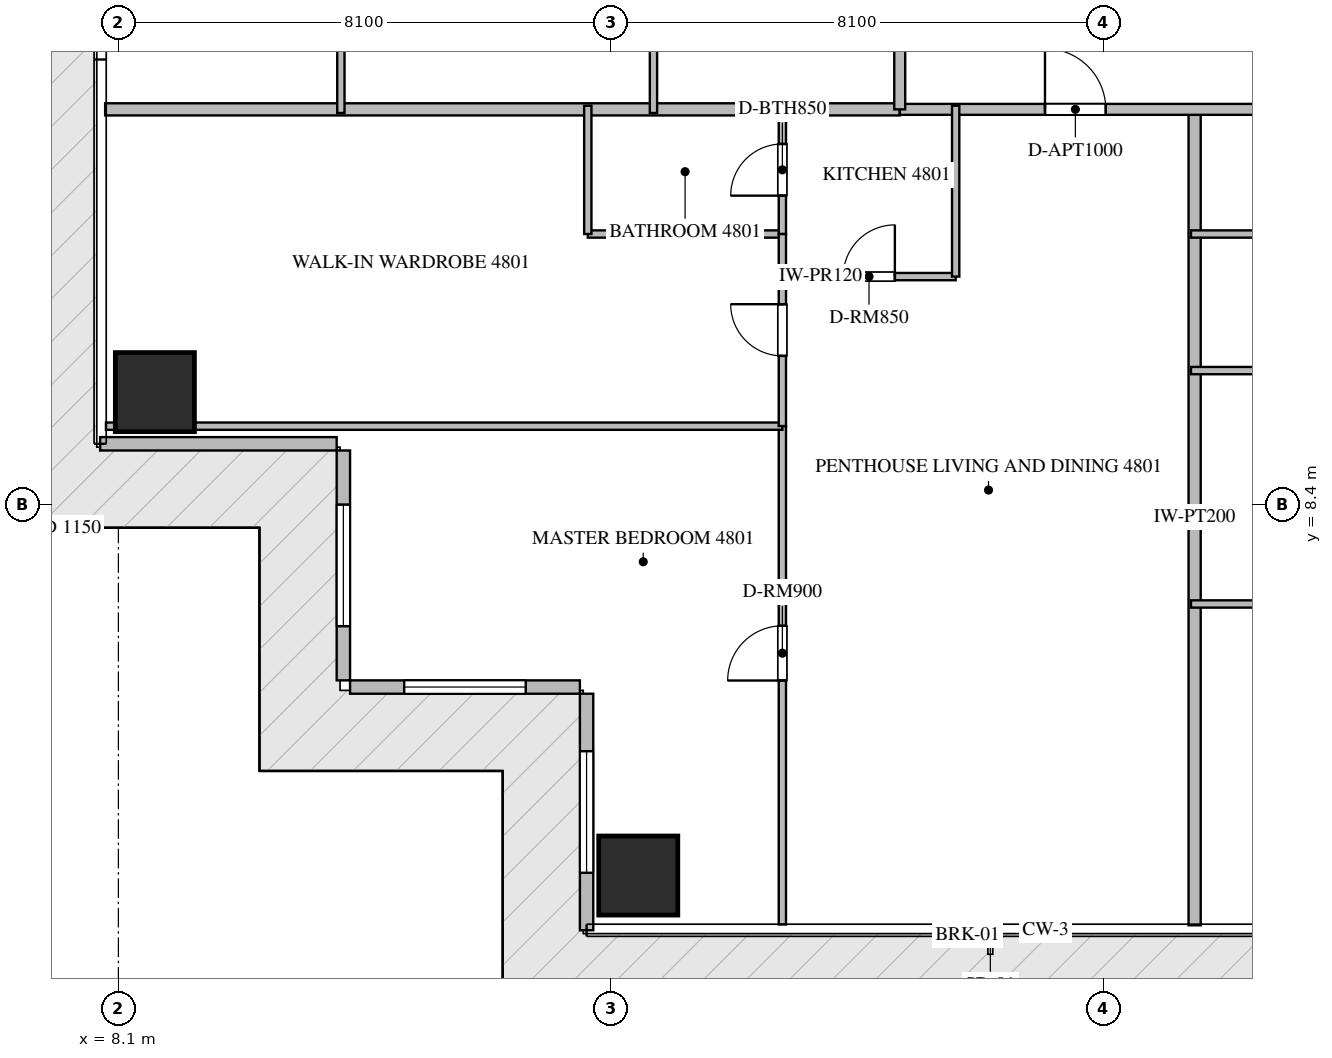
"""IFC4 building model, lengths in metres.
Left out: names, types, materials, properties, quantities, classifications, styles, units other than length and angle.
Written with IfcOpenShell. Run it as: python <this file> out.ifc"""

import sys

from ifc_helpers import new_model, si_unit, direction, frame, frame_2d, origin, origin_2d, place, context, subcontext, project, spatial, rectangle, extrude, source, transform, mapped, element, fill, save


model = new_model("IFC4")
c1 = context("Model", 3, precision=1e-05, world=origin(), true_north=direction((0.0, 1.0)))
c2 = subcontext(c1, "Body", "Model", "MODEL_VIEW")
j1 = project(units=[si_unit("LENGTHUNIT", "METRE"), si_unit("PLANEANGLEUNIT", "RADIAN")], contexts=[c1])
p1 = place(None, origin())
s1 = spatial("IfcSite", under=j1, at=p1, CompositionType="ELEMENT")
p2 = place(p1, origin())
s2 = spatial("IfcBuilding", under=s1, at=p2, CompositionType="ELEMENT")
p3 = place(p2, frame((0.0, 0.0, 191.4)))
s3 = spatial("IfcBuildingStorey", under=s2, at=p3, CompositionType="ELEMENT", Elevation=191.4)
m1 = source(origin(), c2, "Body", "SweptSolid", [
    extrude(rectangle(XDim=1.3, YDim=1.3, at=origin_2d()), origin(), (0.0, 0.0, 1.0), 3.75),
])
for number, where, z_axis, x_axis in (
    (1, (16.65, 2.3, -0.26), (0.0, 0.0, 1.0), (1.0, 0.0, 0.0)),
    (2, (8.7, 10.25, -0.26), (0.0, 0.0, 1.0), (1.0, 0.0, 0.0)),
):
    element("IfcColumn", number, at=place(p3, frame(where, z_axis=z_axis, x_axis=x_axis)), inside=s3, PredefinedType="COLUMN", context=c2, shape_type="MappedRepresentation", body=[
        mapped(m1, transform((0.0, 0.0, 0.0), scale=1.0)),
    ])
p4 = place(p3, frame((7.8, 9.4, 0.0), z_axis=(0.0, 0.0, 1.0), x_axis=(1.0, 0.0, 0.0)))
e3 = element("IfcWall", 3, at=p4, inside=s3, PredefinedType="ELEMENTEDWALL", context=c2, shape_type="SweptSolid", body=[
    extrude(rectangle(XDim=3.89, YDim=0.22, at=frame_2d((1.945, 0.0))), origin(), (0.0, 0.0, 1.0), 3.475),
])
p5 = place(p3, frame((11.8, 9.29, 0.0), z_axis=(0.0, 0.0, 1.0), x_axis=(0.0, -1.0, 0.0)))
e4 = element("IfcWall", 4, at=p5, inside=s3, PredefinedType="ELEMENTEDWALL", context=c2, shape_type="SweptSolid", body=[
    extrude(rectangle(XDim=3.78, YDim=0.22, at=frame_2d((1.89, 0.0))), origin(), (0.0, 0.0, 1.0), 3.475),
])
p6 = place(p5, frame((0.89, 0.0, 0.65)))
e5 = element("IfcOpeningElement", 5, at=p6, cuts=e4, PredefinedType="OPENING", context=c2, shape_type="SweptSolid", body=[
    extrude(rectangle(XDim=2.0, YDim=2.2, at=frame_2d((1.0, 1.1))), frame((0.0, 0.12, 0.0), z_axis=(0.0, -1.0, 0.0), x_axis=(1.0, 0.0, 0.0)), (0.0, 0.0, 1.0), 0.24),
])
p7 = place(p3, frame((11.91, 5.4, 0.0), z_axis=(0.0, 0.0, 1.0), x_axis=(1.0, 0.0, 0.0)))
e6 = element("IfcWall", 6, at=p7, inside=s3, PredefinedType="ELEMENTEDWALL", context=c2, shape_type="SweptSolid", body=[
    extrude(rectangle(XDim=3.78, YDim=0.22, at=frame_2d((1.89, 0.0))), origin(), (0.0, 0.0, 1.0), 3.475),
])
p8 = place(p7, frame((0.89, 0.0, 0.65)))
e7 = element("IfcOpeningElement", 7, at=p8, cuts=e6, PredefinedType="OPENING", context=c2, shape_type="SweptSolid", body=[
    extrude(rectangle(XDim=2.0, YDim=2.2, at=frame_2d((1.0, 1.1))), frame((0.0, 0.12, 0.0), z_axis=(0.0, -1.0, 0.0), x_axis=(1.0, 0.0, 0.0)), (0.0, 0.0, 1.0), 0.24),
])
p9 = place(p3, frame((15.8, 5.29, 0.0), z_axis=(0.0, 0.0, 1.0), x_axis=(0.0, -1.0, 0.0)))
e8 = element("IfcWall", 8, at=p9, inside=s3, PredefinedType="ELEMENTEDWALL", context=c2, shape_type="SweptSolid", body=[
    extrude(rectangle(XDim=3.89, YDim=0.22, at=frame_2d((1.945, 0.0))), origin(), (0.0, 0.0, 1.0), 3.475),
])
p10 = place(p9, frame((0.945, 0.0, 0.65)))
e9 = element("IfcOpeningElement", 9, at=p10, cuts=e8, PredefinedType="OPENING", context=c2, shape_type="SweptSolid", body=[
    extrude(rectangle(XDim=2.0, YDim=2.2, at=frame_2d((1.0, 1.1))), frame((0.0, 0.12, 0.0), z_axis=(0.0, -1.0, 0.0), x_axis=(1.0, 0.0, 0.0)), (0.0, 0.0, 1.0), 0.24),
])
p11 = place(p3, frame((25.8, 1.482, 0.0), z_axis=(0.0, 0.0, 1.0), x_axis=(0.0, 1.0, 0.0)))
e10 = element("IfcWall", 10, at=p11, inside=s3, PredefinedType="PARTITIONING", context=c2, shape_type="SweptSolid", body=[
    extrude(rectangle(XDim=13.418, YDim=0.2, at=frame_2d((6.709, 0.0))), origin(), (0.0, 0.0, 1.0), 3.49),
])
p12 = place(p3, frame((7.882, 14.9, 0.0), z_axis=(0.0, 0.0, 1.0), x_axis=(1.0, 0.0, 0.0)))
e11 = element("IfcWall", 11, at=p12, inside=s3, PredefinedType="PARTITIONING", context=c2, shape_type="SweptSolid", body=[
    extrude(rectangle(XDim=13.068, YDim=0.2, at=frame_2d((6.534, 0.0))), origin(), (0.0, 0.0, 1.0), 3.49),
])
p13 = place(p3, frame((20.952, 14.9, 0.0), z_axis=(0.0, 0.0, 1.0), x_axis=(1.0, 0.0, 0.0)))
e12 = element("IfcWall", 12, at=p13, inside=s3, PredefinedType="PARTITIONING", context=c2, shape_type="SweptSolid", body=[
    extrude(rectangle(XDim=22.896, YDim=0.18, at=frame_2d((11.448, 0.0))), origin(), (0.0, 0.0, 1.0), 3.49),
])
p14 = place(p13, frame((2.387, 0.0, 0.0)))
e13 = element("IfcOpeningElement", 13, at=p14, cuts=e12, PredefinedType="OPENING", context=c2, shape_type="SweptSolid", body=[
    extrude(rectangle(XDim=1.0, YDim=2.15, at=frame_2d((0.5, 1.075))), frame((0.0, 0.1, 0.0), z_axis=(0.0, -1.0, 0.0), x_axis=(1.0, 0.0, 0.0)), (0.0, 0.0, 1.0), 0.2),
])
p15 = place(p13, frame((14.867, 0.0, 0.0)))
e14 = element("IfcOpeningElement", 14, at=p15, cuts=e12, PredefinedType="OPENING", context=c2, shape_type="SweptSolid", body=[
    extrude(rectangle(XDim=1.0, YDim=2.15, at=frame_2d((0.5, 1.075))), frame((0.0, 0.1, 0.0), z_axis=(0.0, -1.0, 0.0), x_axis=(1.0, 0.0, 0.0)), (0.0, 0.0, 1.0), 0.2),
])
p16 = place(p13, frame((19.356, 0.0, 0.0)))
e15 = element("IfcOpeningElement", 15, at=p16, cuts=e12, PredefinedType="OPENING", context=c2, shape_type="SweptSolid", body=[
    extrude(rectangle(XDim=1.0, YDim=2.15, at=frame_2d((0.5, 1.075))), frame((0.0, 0.1, 0.0), z_axis=(0.0, -1.0, 0.0), x_axis=(1.0, 0.0, 0.0)), (0.0, 0.0, 1.0), 0.2),
])
p17 = place(p3, frame((20.95, 14.9, 0.0), z_axis=(0.0, 0.0, 1.0), x_axis=(0.0, 1.0, 0.0)))
e16 = element("IfcWall", 16, at=p17, inside=s3, PredefinedType="PARTITIONING", context=c2, shape_type="SweptSolid", body=[
    extrude(rectangle(XDim=18.7, YDim=0.18, at=frame_2d((9.35, 0.0))), origin(), (0.0, 0.0, 1.0), 3.49),
])
p18 = place(p17, frame((14.603, 0.0, 0.0)))
e17 = element("IfcOpeningElement", 17, at=p18, cuts=e16, PredefinedType="OPENING", context=c2, shape_type="SweptSolid", body=[
    extrude(rectangle(XDim=1.0, YDim=2.15, at=frame_2d((0.5, 1.075))), frame((0.0, 0.1, 0.0), z_axis=(0.0, -1.0, 0.0), x_axis=(1.0, 0.0, 0.0)), (0.0, 0.0, 1.0), 0.2),
])
p19 = place(p3, frame((19.02, 12.15, 0.0), z_axis=(0.0, 0.0, 1.0), x_axis=(1.0, 0.0, 0.0)))
e18 = element("IfcWall", 18, at=p19, inside=s3, PredefinedType="PARTITIONING", context=c2, shape_type="SweptSolid", body=[
    extrude(rectangle(XDim=2.85, YDim=0.12, at=frame_2d((1.425, 0.0))), origin(), (0.0, 0.0, 1.0), 3.49),
])
p20 = place(p19, frame((1.0, 0.0, 0.0)))
e19 = element("IfcOpeningElement", 19, at=p20, cuts=e18, PredefinedType="OPENING", context=c2, shape_type="SweptSolid", body=[
    extrude(rectangle(XDim=0.85, YDim=2.1, at=frame_2d((0.425, 1.05))), frame((0.0, 0.07, 0.0), z_axis=(0.0, -1.0, 0.0), x_axis=(1.0, 0.0, 0.0)), (0.0, 0.0, 1.0), 0.14),
])
p21 = place(p3, frame((21.87, 12.15, 0.0), z_axis=(0.0, 0.0, 1.0), x_axis=(0.0, 1.0, 0.0)))
e20 = element("IfcWall", 20, at=p21, inside=s3, PredefinedType="PARTITIONING", context=c2, shape_type="SweptSolid", body=[
    extrude(rectangle(XDim=2.81, YDim=0.12, at=frame_2d((1.405, 0.0))), origin(), (0.0, 0.0, 1.0), 3.49),
])
p22 = place(p3, frame((19.02, 1.495, 0.0), z_axis=(0.0, 0.0, 1.0), x_axis=(0.0, 1.0, 0.0)))
e21 = element("IfcWall", 21, at=p22, inside=s3, PredefinedType="PARTITIONING", context=c2, shape_type="SweptSolid", body=[
    extrude(rectangle(XDim=8.195, YDim=0.12, at=frame_2d((4.097, 0.0))), origin(), (0.0, 0.0, 1.0), 3.49),
])
p23 = place(p22, frame((4.012, 0.0, 0.0)))
e22 = element("IfcOpeningElement", 22, at=p23, cuts=e21, PredefinedType="OPENING", context=c2, shape_type="SweptSolid", body=[
    extrude(rectangle(XDim=0.9, YDim=2.1, at=frame_2d((0.45, 1.05))), frame((0.0, 0.07, 0.0), z_axis=(0.0, -1.0, 0.0), x_axis=(1.0, 0.0, 0.0)), (0.0, 0.0, 1.0), 0.14),
])
p24 = place(p3, frame((7.895, 9.69, 0.0), z_axis=(0.0, 0.0, 1.0), x_axis=(1.0, 0.0, 0.0)))
e23 = element("IfcWall", 23, at=p24, inside=s3, PredefinedType="PARTITIONING", context=c2, shape_type="SweptSolid", body=[
    extrude(rectangle(XDim=11.125, YDim=0.12, at=frame_2d((5.562, 0.0))), origin(), (0.0, 0.0, 1.0), 3.49),
])
p25 = place(p3, frame((15.82, 12.85, 0.0), z_axis=(0.0, 0.0, 1.0), x_axis=(1.0, 0.0, 0.0)))
e24 = element("IfcWall", 24, at=p25, inside=s3, PredefinedType="PARTITIONING", context=c2, shape_type="SweptSolid", body=[
    extrude(rectangle(XDim=3.2, YDim=0.12, at=frame_2d((1.6, 0.0))), origin(), (0.0, 0.0, 1.0), 3.49),
])
p26 = place(p3, frame((15.82, 12.85, 0.0), z_axis=(0.0, 0.0, 1.0), x_axis=(0.0, 1.0, 0.0)))
e25 = element("IfcWall", 25, at=p26, inside=s3, PredefinedType="PARTITIONING", context=c2, shape_type="SweptSolid", body=[
    extrude(rectangle(XDim=2.11, YDim=0.12, at=frame_2d((1.055, 0.0))), origin(), (0.0, 0.0, 1.0), 3.49),
])
p27 = place(p3, frame((19.02, 9.692, 0.0), z_axis=(0.0, 0.0, 1.0), x_axis=(0.0, 1.0, 0.0)))
e26 = element("IfcWall", 26, at=p27, inside=s3, PredefinedType="PARTITIONING", context=c2, shape_type="SweptSolid", body=[
    extrude(rectangle(XDim=3.158, YDim=0.12, at=frame_2d((1.579, 0.0))), origin(), (0.0, 0.0, 1.0), 3.49),
])
p28 = place(p27, frame((1.154, 0.0, 0.0)))
e27 = element("IfcOpeningElement", 27, at=p28, cuts=e26, PredefinedType="OPENING", context=c2, shape_type="SweptSolid", body=[
    extrude(rectangle(XDim=0.85, YDim=2.1, at=frame_2d((0.425, 1.05))), frame((0.0, 0.07, 0.0), z_axis=(0.0, -1.0, 0.0), x_axis=(1.0, 0.0, 0.0)), (0.0, 0.0, 1.0), 0.14),
])
p29 = place(p3, frame((19.02, 12.852, 0.0), z_axis=(0.0, 0.0, 1.0), x_axis=(0.0, 1.0, 0.0)))
e28 = element("IfcWall", 28, at=p29, inside=s3, PredefinedType="PARTITIONING", context=c2, shape_type="SweptSolid", body=[
    extrude(rectangle(XDim=2.108, YDim=0.12, at=frame_2d((1.054, 0.0))), origin(), (0.0, 0.0, 1.0), 3.49),
])
p30 = place(p29, frame((0.629, 0.0, 0.0)))
e29 = element("IfcOpeningElement", 29, at=p30, cuts=e28, PredefinedType="OPENING", context=c2, shape_type="SweptSolid", body=[
    extrude(rectangle(XDim=0.85, YDim=2.1, at=frame_2d((0.425, 1.05))), frame((0.0, 0.07, 0.0), z_axis=(0.0, -1.0, 0.0), x_axis=(1.0, 0.0, 0.0)), (0.0, 0.0, 1.0), 0.14),
])
for number, where, z_axis, x_axis in (
    (30, (25.74, 6.766, 0.0), (0.0, 0.0, 1.0), (1.0, 0.0, 0.0)),
    (31, (25.74, 10.604, 0.0), (0.0, 0.0, 1.0), (1.0, 0.0, 0.0)),
    (32, (25.74, 12.85, 0.0), (0.0, 0.0, 1.0), (1.0, 0.0, 0.0)),
):
    element("IfcWall", number, at=place(p3, frame(where, z_axis=z_axis, x_axis=x_axis)), inside=s3, PredefinedType="PARTITIONING", context=c2, shape_type="SweptSolid", body=[
        extrude(rectangle(XDim=8.12, YDim=0.12, at=frame_2d((4.06, 0.0))), origin(), (0.0, 0.0, 1.0), 3.49),
    ])
p31 = place(p3, frame((11.759, 14.84, 0.0), z_axis=(0.0, 0.0, 1.0), x_axis=(0.0, 1.0, 0.0)))
e33 = element("IfcWall", 33, at=p31, inside=s3, PredefinedType="PARTITIONING", context=c2, shape_type="SweptSolid", body=[
    extrude(rectangle(XDim=11.65, YDim=0.12, at=frame_2d((5.825, 0.0))), origin(), (0.0, 0.0, 1.0), 3.49),
])
p32 = place(p3, frame((16.9, 14.84, 0.0), z_axis=(0.0, 0.0, 1.0), x_axis=(0.0, 1.0, 0.0)))
e34 = element("IfcWall", 34, at=p32, inside=s3, PredefinedType="PARTITIONING", context=c2, shape_type="SweptSolid", body=[
    extrude(rectangle(XDim=11.65, YDim=0.12, at=frame_2d((5.825, 0.0))), origin(), (0.0, 0.0, 1.0), 2.972),
])
m2 = source(origin(), c2, "Body", "SweptSolid", [
    extrude(rectangle(XDim=2.0, YDim=2.2, at=frame_2d((1.0, 1.1))), frame((0.0, 0.03, 0.0), z_axis=(0.0, -1.0, 0.0), x_axis=(1.0, 0.0, 0.0)), (0.0, 0.0, 1.0), 0.06),
])
p33 = place(p6, origin())
e35 = element("IfcWindow", 35, at=p33, inside=s3, PartitioningType="SINGLE_PANEL", PredefinedType="WINDOW", context=c2, shape_type="MappedRepresentation", body=[
    mapped(m2, transform((0.0, 0.0, 0.0), scale=1.0)),
])
fill(e5, e35)
p34 = place(p8, origin())
e36 = element("IfcWindow", 36, at=p34, inside=s3, PartitioningType="SINGLE_PANEL", PredefinedType="WINDOW", context=c2, shape_type="MappedRepresentation", body=[
    mapped(m2, transform((0.0, 0.0, 0.0), scale=1.0)),
])
fill(e7, e36)
p35 = place(p10, origin())
e37 = element("IfcWindow", 37, at=p35, inside=s3, PartitioningType="SINGLE_PANEL", PredefinedType="WINDOW", context=c2, shape_type="MappedRepresentation", body=[
    mapped(m2, transform((0.0, 0.0, 0.0), scale=1.0)),
])
fill(e9, e37)
m3 = source(origin(), c2, "Body", "SweptSolid", [
    extrude(rectangle(XDim=1.0, YDim=2.15, at=frame_2d((0.5, 1.075))), frame((0.0, 0.025, 0.0), z_axis=(0.0, -1.0, 0.0), x_axis=(1.0, 0.0, 0.0)), (0.0, 0.0, 1.0), 0.05),
])
p36 = place(p14, origin())
e38 = element("IfcDoor", 38, at=p36, inside=s3, OperationType="SINGLE_SWING_LEFT", PredefinedType="DOOR", context=c2, shape_type="MappedRepresentation", body=[
    mapped(m3, transform((0.0, 0.0, 0.0), scale=1.0)),
])
fill(e13, e38)
m4 = source(origin(), c2, "Body", "SweptSolid", [
    extrude(rectangle(XDim=0.85, YDim=2.1, at=frame_2d((0.425, 1.05))), frame((0.0, 0.025, 0.0), z_axis=(0.0, -1.0, 0.0), x_axis=(1.0, 0.0, 0.0)), (0.0, 0.0, 1.0), 0.05),
])
p37 = place(p20, origin())
e39 = element("IfcDoor", 39, at=p37, inside=s3, OperationType="SINGLE_SWING_RIGHT", PredefinedType="DOOR", context=c2, shape_type="MappedRepresentation", body=[
    mapped(m4, transform((0.0, 0.0, 0.0), scale=1.0)),
])
fill(e19, e39)
m5 = source(origin(), c2, "Body", "SweptSolid", [
    extrude(rectangle(XDim=0.9, YDim=2.1, at=frame_2d((0.45, 1.05))), frame((0.0, 0.025, 0.0), z_axis=(0.0, -1.0, 0.0), x_axis=(1.0, 0.0, 0.0)), (0.0, 0.0, 1.0), 0.05),
])
p38 = place(p23, origin())
e40 = element("IfcDoor", 40, at=p38, inside=s3, OperationType="SINGLE_SWING_LEFT", PredefinedType="DOOR", context=c2, shape_type="MappedRepresentation", body=[
    mapped(m5, transform((0.0, 0.0, 0.0), scale=1.0)),
])
fill(e22, e40)
p39 = place(p28, origin())
e41 = element("IfcDoor", 41, at=p39, inside=s3, OperationType="SINGLE_SWING_RIGHT", PredefinedType="DOOR", context=c2, shape_type="MappedRepresentation", body=[
    mapped(m4, transform((0.0, 0.0, 0.0), scale=1.0)),
])
fill(e27, e41)
p40 = place(p30, origin())
e42 = element("IfcDoor", 42, at=p40, inside=s3, OperationType="SINGLE_SWING_LEFT", PredefinedType="DOOR", context=c2, shape_type="MappedRepresentation", body=[
    mapped(m4, transform((0.0, 0.0, 0.0), scale=1.0)),
])
fill(e29, e42)
save(model, sys.argv[1])
